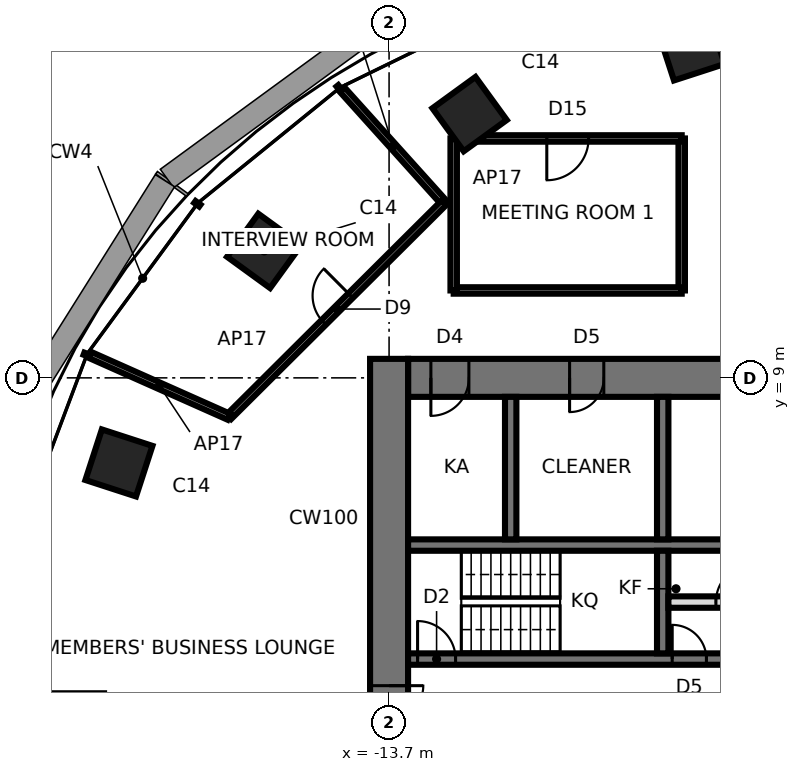
"""IFC4 building model, lengths in metres.
Left out: names, types, materials, properties, quantities, classifications, styles, units other than length and angle.
Written with IfcOpenShell. Run it as: python <this file> out.ifc"""

import sys

from ifc_helpers import new_model, si_unit, direction, frame, frame_2d, origin, origin_2d, place, context, subcontext, project, spatial, rectangle, extrude, element, fill, save


model = new_model("IFC4")
c1 = context("Model", 3, precision=1e-05, world=origin(), true_north=direction((0.0, 1.0)))
c2 = subcontext(c1, "Body", "Model", "MODEL_VIEW")
j1 = project(units=[si_unit("LENGTHUNIT", "METRE"), si_unit("PLANEANGLEUNIT", "RADIAN")], contexts=[c1])
p1 = place(None, origin())
s1 = spatial("IfcSite", under=j1, at=p1, CompositionType="ELEMENT")
p2 = place(p1, origin())
s2 = spatial("IfcBuilding", under=s1, at=p2, CompositionType="ELEMENT")
p3 = place(p2, frame((0.0, 0.0, 242.3)))
s3 = spatial("IfcBuildingStorey", under=s2, at=p3, CompositionType="ELEMENT", Elevation=242.3)
for number, where, z_axis, x_axis in (
    (1, (-5.754, 17.708, 0.0), (0.0, 0.0, 1.0), (-0.309, 0.951, 0.0)),
    (2, (-11.581, 15.94, 0.0), (0.0, 0.0, 1.0), (-0.588, 0.809, 0.0)),
    (3, (-16.986, 12.341, 0.0), (0.0, 0.0, 1.0), (-0.809, 0.588, 0.0)),
    (4, (-20.808, 6.761, 0.0), (0.0, 0.0, 1.0), (-0.951, 0.309, 0.0)),
):
    element("IfcColumn", number, at=place(p3, frame(where, z_axis=z_axis, x_axis=x_axis)), inside=s3, PredefinedType="COLUMN", context=c2, shape_type="SweptSolid", body=[
        extrude(rectangle(XDim=1.4, YDim=1.4, at=origin_2d()), origin(), (0.0, 0.0, 1.0), 3.9),
    ])
p4 = place(p3, frame((13.2, 9.0, 0.0), z_axis=(0.0, 0.0, 1.0), x_axis=(-1.0, 0.0, 0.0)))
e5 = element("IfcWall", 5, at=p4, inside=s3, PredefinedType="SHEAR", context=c2, shape_type="SweptSolid", body=[
    extrude(rectangle(XDim=26.4, YDim=1.0, at=frame_2d((13.2, 0.0))), origin(), (0.0, 0.0, 1.0), 3.9),
])
p5 = place(p4, frame((2.65, 0.0, 0.0)))
e6 = element("IfcOpeningElement", 6, at=p5, cuts=e5, PredefinedType="OPENING", context=c2, shape_type="SweptSolid", body=[
    extrude(rectangle(XDim=0.9, YDim=2.1, at=frame_2d((0.45, 1.05))), frame((0.0, 0.51, 0.0), z_axis=(0.0, -1.0, 0.0), x_axis=(1.0, 0.0, 0.0)), (0.0, 0.0, 1.0), 1.02),
])
p6 = place(p4, frame((9.5, 0.0, 0.0)))
e7 = element("IfcOpeningElement", 7, at=p6, cuts=e5, PredefinedType="OPENING", context=c2, shape_type="SweptSolid", body=[
    extrude(rectangle(XDim=0.9, YDim=2.1, at=frame_2d((0.45, 1.05))), frame((0.0, 0.51, 0.0), z_axis=(0.0, -1.0, 0.0), x_axis=(1.0, 0.0, 0.0)), (0.0, 0.0, 1.0), 1.02),
])
p7 = place(p4, frame((16.0, 0.0, 0.0)))
e8 = element("IfcOpeningElement", 8, at=p7, cuts=e5, PredefinedType="OPENING", context=c2, shape_type="SweptSolid", body=[
    extrude(rectangle(XDim=0.9, YDim=2.1, at=frame_2d((0.45, 1.05))), frame((0.0, 0.51, 0.0), z_axis=(0.0, -1.0, 0.0), x_axis=(1.0, 0.0, 0.0)), (0.0, 0.0, 1.0), 1.02),
])
p8 = place(p4, frame((21.25, 0.0, 0.0)))
e9 = element("IfcOpeningElement", 9, at=p8, cuts=e5, PredefinedType="OPENING", context=c2, shape_type="SweptSolid", body=[
    extrude(rectangle(XDim=0.9, YDim=2.1, at=frame_2d((0.45, 1.05))), frame((0.0, 0.51, 0.0), z_axis=(0.0, -1.0, 0.0), x_axis=(1.0, 0.0, 0.0)), (0.0, 0.0, 1.0), 1.02),
])
p9 = place(p4, frame((24.8, 0.0, 0.0)))
e10 = element("IfcOpeningElement", 10, at=p9, cuts=e5, PredefinedType="OPENING", context=c2, shape_type="SweptSolid", body=[
    extrude(rectangle(XDim=1.0, YDim=2.1, at=frame_2d((0.5, 1.05))), frame((0.0, 0.51, 0.0), z_axis=(0.0, -1.0, 0.0), x_axis=(1.0, 0.0, 0.0)), (0.0, 0.0, 1.0), 1.02),
])
p10 = place(p3, frame((-13.7, 9.5, 0.0), z_axis=(0.0, 0.0, 1.0), x_axis=(0.0, -1.0, 0.0)))
e11 = element("IfcWall", 11, at=p10, inside=s3, PredefinedType="SHEAR", context=c2, shape_type="SweptSolid", body=[
    extrude(rectangle(XDim=19.0, YDim=1.0, at=frame_2d((9.5, 0.0))), origin(), (0.0, 0.0, 1.0), 3.9),
])
p11 = place(p10, frame((8.6, 0.0, 0.0)))
e12 = element("IfcOpeningElement", 12, at=p11, cuts=e11, PredefinedType="OPENING", context=c2, shape_type="SweptSolid", body=[
    extrude(rectangle(XDim=1.8, YDim=2.4, at=frame_2d((0.9, 1.2))), frame((0.0, 0.51, 0.0), z_axis=(0.0, -1.0, 0.0), x_axis=(1.0, 0.0, 0.0)), (0.0, 0.0, 1.0), 1.02),
])
p12 = place(p3, frame((-13.2, 1.6, 0.0), z_axis=(0.0, 0.0, 1.0), x_axis=(1.0, 0.0, 0.0)))
e13 = element("IfcWall", 13, at=p12, inside=s3, PredefinedType="SHEAR", context=c2, shape_type="SweptSolid", body=[
    extrude(rectangle(XDim=26.4, YDim=0.3, at=frame_2d((13.2, 0.0))), origin(), (0.0, 0.0, 1.0), 3.9),
])
p13 = place(p12, frame((0.25, 0.0, 0.0)))
e14 = element("IfcOpeningElement", 14, at=p13, cuts=e13, PredefinedType="OPENING", context=c2, shape_type="SweptSolid", body=[
    extrude(rectangle(XDim=1.0, YDim=2.1, at=frame_2d((0.5, 1.05))), frame((0.0, 0.16, 0.0), z_axis=(0.0, -1.0, 0.0), x_axis=(1.0, 0.0, 0.0)), (0.0, 0.0, 1.0), 0.32),
])
p14 = place(p12, frame((23.05, 0.0, 0.0)))
e15 = element("IfcOpeningElement", 15, at=p14, cuts=e13, PredefinedType="OPENING", context=c2, shape_type="SweptSolid", body=[
    extrude(rectangle(XDim=1.1, YDim=2.3, at=frame_2d((0.55, 1.15))), frame((0.0, 0.16, 0.0), z_axis=(0.0, -1.0, 0.0), x_axis=(1.0, 0.0, 0.0)), (0.0, 0.0, 1.0), 0.32),
])
p15 = place(p12, frame((20.25, 0.0, 0.0)))
e16 = element("IfcOpeningElement", 16, at=p15, cuts=e13, PredefinedType="OPENING", context=c2, shape_type="SweptSolid", body=[
    extrude(rectangle(XDim=1.5, YDim=2.4, at=frame_2d((0.75, 1.2))), frame((0.0, 0.16, 0.0), z_axis=(0.0, -1.0, 0.0), x_axis=(1.0, 0.0, 0.0)), (0.0, 0.0, 1.0), 0.32),
])
p16 = place(p12, frame((6.95, 0.0, 0.0)))
e17 = element("IfcOpeningElement", 17, at=p16, cuts=e13, PredefinedType="OPENING", context=c2, shape_type="SweptSolid", body=[
    extrude(rectangle(XDim=0.9, YDim=2.1, at=frame_2d((0.45, 1.05))), frame((0.0, 0.16, 0.0), z_axis=(0.0, -1.0, 0.0), x_axis=(1.0, 0.0, 0.0)), (0.0, 0.0, 1.0), 0.32),
])
p17 = place(p12, frame((9.55, 0.0, 0.0)))
e18 = element("IfcOpeningElement", 18, at=p17, cuts=e13, PredefinedType="OPENING", context=c2, shape_type="SweptSolid", body=[
    extrude(rectangle(XDim=0.9, YDim=2.1, at=frame_2d((0.45, 1.05))), frame((0.0, 0.16, 0.0), z_axis=(0.0, -1.0, 0.0), x_axis=(1.0, 0.0, 0.0)), (0.0, 0.0, 1.0), 0.32),
])
p18 = place(p12, frame((12.15, 0.0, 0.0)))
e19 = element("IfcOpeningElement", 19, at=p18, cuts=e13, PredefinedType="OPENING", context=c2, shape_type="SweptSolid", body=[
    extrude(rectangle(XDim=0.9, YDim=2.1, at=frame_2d((0.45, 1.05))), frame((0.0, 0.16, 0.0), z_axis=(0.0, -1.0, 0.0), x_axis=(1.0, 0.0, 0.0)), (0.0, 0.0, 1.0), 0.32),
])
p19 = place(p12, frame((25.45, 0.0, 0.0)))
e20 = element("IfcOpeningElement", 20, at=p19, cuts=e13, PredefinedType="OPENING", context=c2, shape_type="SweptSolid", body=[
    extrude(rectangle(XDim=0.9, YDim=2.1, at=frame_2d((0.45, 1.05))), frame((0.0, 0.16, 0.0), z_axis=(0.0, -1.0, 0.0), x_axis=(1.0, 0.0, 0.0)), (0.0, 0.0, 1.0), 0.32),
])
p20 = place(p3, frame((-13.2, 4.6, 0.0), z_axis=(0.0, 0.0, 1.0), x_axis=(1.0, 0.0, 0.0)))
e21 = element("IfcWall", 21, at=p20, inside=s3, PredefinedType="SHEAR", context=c2, shape_type="SweptSolid", body=[
    extrude(rectangle(XDim=26.4, YDim=0.3, at=frame_2d((13.2, 0.0))), origin(), (0.0, 0.0, 1.0), 3.9),
])
p21 = place(p3, frame((-6.5, 1.75, 0.0), z_axis=(0.0, 0.0, 1.0), x_axis=(0.0, 1.0, 0.0)))
e22 = element("IfcWall", 22, at=p21, inside=s3, PredefinedType="SHEAR", context=c2, shape_type="SweptSolid", body=[
    extrude(rectangle(XDim=2.7, YDim=0.3, at=frame_2d((1.35, 0.0))), origin(), (0.0, 0.0, 1.0), 3.9),
])
for number, where, z_axis, x_axis in (
    (23, (-6.5, 4.75, 0.0), (0.0, 0.0, 1.0), (0.0, 1.0, 0.0)),
    (24, (-10.5, 4.75, 0.0), (0.0, 0.0, 1.0), (0.0, 1.0, 0.0)),
):
    element("IfcWall", number, at=place(p3, frame(where, z_axis=z_axis, x_axis=x_axis)), inside=s3, PredefinedType="SHEAR", context=c2, shape_type="SweptSolid", body=[
        extrude(rectangle(XDim=3.75, YDim=0.3, at=frame_2d((1.875, 0.0))), origin(), (0.0, 0.0, 1.0), 3.9),
    ])
p22 = place(p3, frame((-6.35, 3.1, 0.0), z_axis=(0.0, 0.0, 1.0), x_axis=(1.0, 0.0, 0.0)))
e25 = element("IfcWall", 25, at=p22, inside=s3, PredefinedType="PARTITIONING", context=c2, shape_type="SweptSolid", body=[
    extrude(rectangle(XDim=2.35, YDim=0.3, at=frame_2d((1.175, 0.0))), origin(), (0.0, 0.0, 1.0), 3.7),
])
p23 = place(p22, frame((1.25, 0.0, 0.0)))
e26 = element("IfcOpeningElement", 26, at=p23, cuts=e25, PredefinedType="OPENING", context=c2, shape_type="SweptSolid", body=[
    extrude(rectangle(XDim=1.0, YDim=2.4, at=frame_2d((0.5, 1.2))), frame((0.0, 0.16, 0.0), z_axis=(0.0, -1.0, 0.0), x_axis=(1.0, 0.0, 0.0)), (0.0, 0.0, 1.0), 0.32),
])
p24 = place(p3, frame((-6.0, 15.3, 0.0), z_axis=(0.0, 0.0, 1.0), x_axis=(0.0, -1.0, 0.0)))
e27 = element("IfcWall", 27, at=p24, inside=s3, PredefinedType="PARTITIONING", context=c2, shape_type="SweptSolid", body=[
    extrude(rectangle(XDim=4.0, YDim=0.17, at=frame_2d((2.0, 0.0))), origin(), (0.0, 0.0, 1.0), 3.7),
])
p25 = place(p3, frame((-12.0, 15.3, 0.0), z_axis=(0.0, 0.0, 1.0), x_axis=(1.0, 0.0, 0.0)))
e28 = element("IfcWall", 28, at=p25, inside=s3, PredefinedType="PARTITIONING", context=c2, shape_type="SweptSolid", body=[
    extrude(rectangle(XDim=6.0, YDim=0.17, at=frame_2d((3.0, 0.0))), origin(), (0.0, 0.0, 1.0), 3.7),
])
p26 = place(p25, frame((2.45, 0.0, 0.0)))
e29 = element("IfcOpeningElement", 29, at=p26, cuts=e28, PredefinedType="OPENING", context=c2, shape_type="SweptSolid", body=[
    extrude(rectangle(XDim=1.1, YDim=2.4, at=frame_2d((0.55, 1.2))), frame((0.0, 0.095, 0.0), z_axis=(0.0, -1.0, 0.0), x_axis=(1.0, 0.0, 0.0)), (0.0, 0.0, 1.0), 0.19),
])
p27 = place(p3, frame((-6.0, 11.3, 0.0), z_axis=(0.0, 0.0, 1.0), x_axis=(-1.0, 0.0, 0.0)))
e30 = element("IfcWall", 30, at=p27, inside=s3, PredefinedType="PARTITIONING", context=c2, shape_type="SweptSolid", body=[
    extrude(rectangle(XDim=6.0, YDim=0.17, at=frame_2d((3.0, 0.0))), origin(), (0.0, 0.0, 1.0), 3.7),
])
for number, where, z_axis, x_axis in (
    (31, (-12.255, 13.61, 0.0), (0.0, 0.0, 1.0), (-0.669, 0.743, 0.0)),
    (32, (-12.0, 11.3, 0.0), (0.0, 0.0, 1.0), (0.0, 1.0, 0.0)),
):
    element("IfcWall", number, at=place(p3, frame(where, z_axis=z_axis, x_axis=x_axis)), inside=s3, PredefinedType="PARTITIONING", context=c2, shape_type="SweptSolid", body=[
        extrude(rectangle(XDim=4.0, YDim=0.17, at=frame_2d((2.0, 0.0))), origin(), (0.0, 0.0, 1.0), 3.7),
    ])
p28 = place(p3, frame((-17.915, 7.976, 0.0), z_axis=(0.0, 0.0, 1.0), x_axis=(0.708725182581, 0.705484667145, 0.0)))
e33 = element("IfcWall", 33, at=p28, inside=s3, PredefinedType="PARTITIONING", context=c2, shape_type="SweptSolid", body=[
    extrude(rectangle(XDim=7.986, YDim=0.17, at=frame_2d((3.993, 0.0))), origin(), (0.0, 0.0, 1.0), 3.7),
])
p29 = place(p28, frame((3.518, 0.0, 0.0)))
e34 = element("IfcOpeningElement", 34, at=p29, cuts=e33, PredefinedType="OPENING", context=c2, shape_type="SweptSolid", body=[
    extrude(rectangle(XDim=1.0, YDim=2.4, at=frame_2d((0.5, 1.2))), frame((0.0, 0.095, 0.0), z_axis=(0.0, -1.0, 0.0), x_axis=(1.0, 0.0, 0.0)), (0.0, 0.0, 1.0), 0.19),
])
p30 = place(p3, frame((-21.569, 9.603, 0.0), z_axis=(0.0, 0.0, 1.0), x_axis=(0.913549606868, -0.406727323635, 0.0)))
e35 = element("IfcWall", 35, at=p30, inside=s3, PredefinedType="PARTITIONING", context=c2, shape_type="SweptSolid", body=[
    extrude(rectangle(XDim=4.0, YDim=0.17, at=frame_2d((2.0, 0.0))), origin(), (0.0, 0.0, 1.0), 3.7),
])
p31 = place(p11, origin())
e36 = element("IfcDoor", 36, at=p31, inside=s3, OperationType="DOUBLE_DOOR_SINGLE_SWING", PredefinedType="DOOR", context=c2, shape_type="SweptSolid", body=[
    extrude(rectangle(XDim=1.72, YDim=2.36, at=frame_2d((0.9, 1.18))), frame((0.0, 0.025, 0.0), z_axis=(0.0, -1.0, 0.0), x_axis=(1.0, 0.0, 0.0)), (0.0, 0.0, 1.0), 0.05),
    extrude(rectangle(XDim=0.04, YDim=2.4, at=frame_2d((0.02, 1.2))), frame((0.0, 0.25, 0.0), z_axis=(0.0, -1.0, 0.0), x_axis=(1.0, 0.0, 0.0)), (0.0, 0.0, 1.0), 0.5),
    extrude(rectangle(XDim=0.04, YDim=2.4, at=frame_2d((1.78, 1.2))), frame((0.0, 0.25, 0.0), z_axis=(0.0, -1.0, 0.0), x_axis=(1.0, 0.0, 0.0)), (0.0, 0.0, 1.0), 0.5),
    extrude(rectangle(XDim=1.72, YDim=0.04, at=frame_2d((0.9, 2.38))), frame((0.0, 0.25, 0.0), z_axis=(0.0, -1.0, 0.0), x_axis=(1.0, 0.0, 0.0)), (0.0, 0.0, 1.0), 0.5),
])
fill(e12, e36)
p32 = place(p13, origin())
e37 = element("IfcDoor", 37, at=p32, inside=s3, OperationType="SINGLE_SWING_LEFT", PredefinedType="DOOR", context=c2, shape_type="SweptSolid", body=[
    extrude(rectangle(XDim=1.0, YDim=2.1, at=frame_2d((0.5, 1.05))), frame((0.0, 0.025, 0.0), z_axis=(0.0, -1.0, 0.0), x_axis=(1.0, 0.0, 0.0)), (0.0, 0.0, 1.0), 0.05),
])
fill(e14, e37)
p33 = place(p23, origin())
e38 = element("IfcDoor", 38, at=p33, inside=s3, OperationType="SINGLE_SWING_RIGHT", PredefinedType="DOOR", context=c2, shape_type="SweptSolid", body=[
    extrude(rectangle(XDim=1.0, YDim=2.4, at=frame_2d((0.5, 1.2))), frame((0.0, 0.025, 0.0), z_axis=(0.0, -1.0, 0.0), x_axis=(1.0, 0.0, 0.0)), (0.0, 0.0, 1.0), 0.05),
])
fill(e26, e38)
p34 = place(p16, origin())
e39 = element("IfcDoor", 39, at=p34, inside=s3, OperationType="SINGLE_SWING_LEFT", PredefinedType="DOOR", context=c2, shape_type="SweptSolid", body=[
    extrude(rectangle(XDim=0.9, YDim=2.1, at=frame_2d((0.45, 1.05))), frame((0.0, 0.025, 0.0), z_axis=(0.0, -1.0, 0.0), x_axis=(1.0, 0.0, 0.0)), (0.0, 0.0, 1.0), 0.05),
])
fill(e17, e39)
p35 = place(p8, origin())
e40 = element("IfcDoor", 40, at=p35, inside=s3, OperationType="SINGLE_SWING_RIGHT", PredefinedType="DOOR", context=c2, shape_type="SweptSolid", body=[
    extrude(rectangle(XDim=0.82, YDim=2.06, at=frame_2d((0.45, 1.03))), frame((0.0, 0.025, 0.0), z_axis=(0.0, -1.0, 0.0), x_axis=(1.0, 0.0, 0.0)), (0.0, 0.0, 1.0), 0.05),
    extrude(rectangle(XDim=0.04, YDim=2.1, at=frame_2d((0.02, 1.05))), frame((0.0, 0.25, 0.0), z_axis=(0.0, -1.0, 0.0), x_axis=(1.0, 0.0, 0.0)), (0.0, 0.0, 1.0), 0.5),
    extrude(rectangle(XDim=0.04, YDim=2.1, at=frame_2d((0.88, 1.05))), frame((0.0, 0.25, 0.0), z_axis=(0.0, -1.0, 0.0), x_axis=(1.0, 0.0, 0.0)), (0.0, 0.0, 1.0), 0.5),
    extrude(rectangle(XDim=0.82, YDim=0.04, at=frame_2d((0.45, 2.08))), frame((0.0, 0.25, 0.0), z_axis=(0.0, -1.0, 0.0), x_axis=(1.0, 0.0, 0.0)), (0.0, 0.0, 1.0), 0.5),
])
fill(e9, e40)
p36 = place(p9, origin())
e41 = element("IfcDoor", 41, at=p36, inside=s3, OperationType="SINGLE_SWING_RIGHT", PredefinedType="DOOR", context=c2, shape_type="SweptSolid", body=[
    extrude(rectangle(XDim=0.92, YDim=2.06, at=frame_2d((0.5, 1.03))), frame((0.0, 0.025, 0.0), z_axis=(0.0, -1.0, 0.0), x_axis=(1.0, 0.0, 0.0)), (0.0, 0.0, 1.0), 0.05),
    extrude(rectangle(XDim=0.04, YDim=2.1, at=frame_2d((0.02, 1.05))), frame((0.0, 0.25, 0.0), z_axis=(0.0, -1.0, 0.0), x_axis=(1.0, 0.0, 0.0)), (0.0, 0.0, 1.0), 0.5),
    extrude(rectangle(XDim=0.04, YDim=2.1, at=frame_2d((0.98, 1.05))), frame((0.0, 0.25, 0.0), z_axis=(0.0, -1.0, 0.0), x_axis=(1.0, 0.0, 0.0)), (0.0, 0.0, 1.0), 0.5),
    extrude(rectangle(XDim=0.92, YDim=0.04, at=frame_2d((0.5, 2.08))), frame((0.0, 0.25, 0.0), z_axis=(0.0, -1.0, 0.0), x_axis=(1.0, 0.0, 0.0)), (0.0, 0.0, 1.0), 0.5),
])
fill(e10, e41)
p37 = place(p29, origin())
e42 = element("IfcDoor", 42, at=p37, inside=s3, OperationType="SINGLE_SWING_RIGHT", PredefinedType="DOOR", context=c2, shape_type="SweptSolid", body=[
    extrude(rectangle(XDim=1.0, YDim=2.4, at=frame_2d((0.5, 1.2))), frame((0.0, 0.025, 0.0), z_axis=(0.0, -1.0, 0.0), x_axis=(1.0, 0.0, 0.0)), (0.0, 0.0, 1.0), 0.05),
])
fill(e34, e42)
p38 = place(p26, frame((1.1, 0.0, 0.0), z_axis=(0.0, 0.0, 1.0), x_axis=(-1.0, 0.0, 0.0)))
e43 = element("IfcDoor", 43, at=p38, inside=s3, OperationType="SINGLE_SWING_RIGHT", PredefinedType="DOOR", context=c2, shape_type="SweptSolid", body=[
    extrude(rectangle(XDim=1.1, YDim=2.4, at=frame_2d((0.55, 1.2))), frame((0.0, 0.025, 0.0), z_axis=(0.0, -1.0, 0.0), x_axis=(1.0, 0.0, 0.0)), (0.0, 0.0, 1.0), 0.05),
])
fill(e29, e43)
save(model, sys.argv[1])
